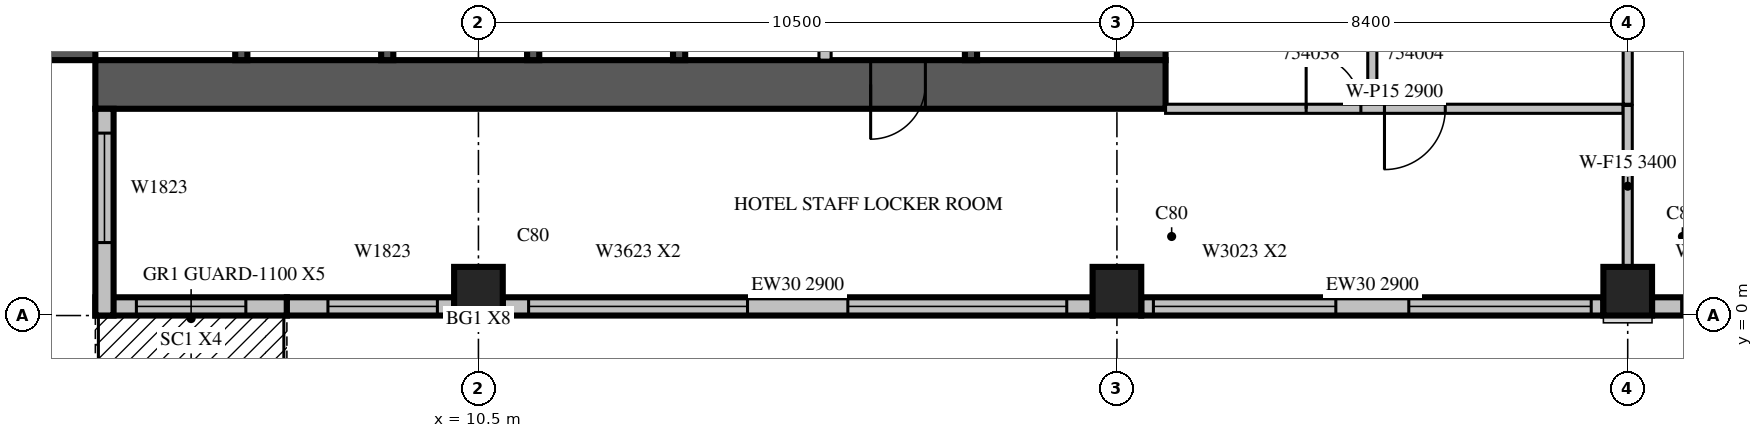
"""IFC4 building model, lengths in metres.
Left out: names, types, materials, properties, quantities, classifications, styles, units other than length and angle.
Written with IfcOpenShell. Run it as: python <this file> out.ifc"""

import sys

from ifc_helpers import new_model, si_unit, direction, frame, frame_2d, origin, origin_2d, place, context, subcontext, project, spatial, rectangle, extrude, source, transform, mapped, element, fill, save


model = new_model("IFC4")
c1 = context("Model", 3, precision=1e-05, world=origin(), true_north=direction((0.0, 1.0)))
c2 = subcontext(c1, "Body", "Model", "MODEL_VIEW")
j1 = project(units=[si_unit("LENGTHUNIT", "METRE"), si_unit("PLANEANGLEUNIT", "RADIAN")], contexts=[c1])
p1 = place(None, origin())
s1 = spatial("IfcSite", under=j1, at=p1, CompositionType="ELEMENT")
p2 = place(p1, origin())
s2 = spatial("IfcBuilding", under=s1, at=p2, CompositionType="ELEMENT")
p3 = place(p2, frame((0.0, 0.0, 238.6)))
s3 = spatial("IfcBuildingStorey", under=s2, at=p3, CompositionType="ELEMENT", Elevation=238.6)
m1 = source(origin(), c2, "Body", "SweptSolid", [
    extrude(rectangle(XDim=0.8, YDim=0.8, at=origin_2d()), origin(), (0.0, 0.0, 1.0), 3.8),
])
for number, where, z_axis, x_axis in (
    (1, (10.5, 0.4, 0.0), (0.0, 0.0, 1.0), (1.0, 0.0, 0.0)),
    (2, (21.0, 0.4, 0.0), (0.0, 0.0, 1.0), (1.0, 0.0, 0.0)),
    (3, (29.4, 0.4, 0.0), (0.0, 0.0, 1.0), (1.0, 0.0, 0.0)),
):
    element("IfcColumn", number, at=place(p3, frame(where, z_axis=z_axis, x_axis=x_axis)), inside=s3, PredefinedType="COLUMN", context=c2, shape_type="MappedRepresentation", body=[
        mapped(m1, transform((0.0, 0.0, 0.0), scale=1.0)),
    ])
m2 = source(origin(), c2, "Body", "SweptSolid", [
    extrude(rectangle(XDim=17.6, YDim=0.8, at=frame_2d((8.8, 0.0))), origin(), (0.0, 0.0, 1.0), 3.8),
])
p4 = place(p3, frame((3.8, 4.2, 0.0), z_axis=(0.0, 0.0, 1.0), x_axis=(0.0, 1.0, 0.0)))
e4 = element("IfcWall", 4, at=p4, inside=s3, PredefinedType="SHEAR", context=c2, shape_type="MappedRepresentation", body=[
    mapped(m2, transform((0.0, 0.0, 0.0), scale=1.0)),
])
m3 = source(origin(), c2, "Body", "SweptSolid", [
    extrude(rectangle(XDim=2.2, YDim=2.1, at=frame_2d((1.1, 1.05))), frame((0.0, 0.41, 0.0), z_axis=(0.0, -1.0, 0.0), x_axis=(1.0, 0.0, 0.0)), (0.0, 0.0, 1.0), 0.82),
])
p5 = place(p4, frame((4.2, 0.0, 0.0)))
e5 = element("IfcOpeningElement", 5, at=p5, cuts=e4, PredefinedType="OPENING", context=c2, shape_type="MappedRepresentation", body=[
    mapped(m3, transform((0.0, 0.0, 0.0), scale=1.0)),
])
m4 = source(origin(), c2, "Body", "SweptSolid", [
    extrude(rectangle(XDim=0.9, YDim=2.1, at=frame_2d((0.45, 1.05))), frame((0.0, 0.41, 0.0), z_axis=(0.0, -1.0, 0.0), x_axis=(1.0, 0.0, 0.0)), (0.0, 0.0, 1.0), 0.82),
])
p6 = place(p4, frame((10.95, 0.0, 0.0)))
e6 = element("IfcOpeningElement", 6, at=p6, cuts=e4, PredefinedType="OPENING", context=c2, shape_type="MappedRepresentation", body=[
    mapped(m4, transform((0.0, 0.0, 0.0), scale=1.0)),
])
m5 = source(origin(), c2, "Body", "SweptSolid", [
    extrude(rectangle(XDim=16.8, YDim=0.8, at=frame_2d((8.4, 0.0))), origin(), (0.0, 0.0, 1.0), 3.8),
])
p7 = place(p3, frame((21.4, 4.2, 0.0), z_axis=(0.0, 0.0, 1.0), x_axis=(0.0, 1.0, 0.0)))
e7 = element("IfcWall", 7, at=p7, inside=s3, PredefinedType="SHEAR", context=c2, shape_type="MappedRepresentation", body=[
    mapped(m5, transform((0.0, 0.0, 0.0), scale=1.0)),
])
p8 = place(p7, frame((4.2, 0.0, 0.0)))
e8 = element("IfcOpeningElement", 8, at=p8, cuts=e7, PredefinedType="OPENING", context=c2, shape_type="MappedRepresentation", body=[
    mapped(m3, transform((0.0, 0.0, 0.0), scale=1.0)),
])
m6 = source(origin(), c2, "Body", "SweptSolid", [
    extrude(rectangle(XDim=1.2, YDim=2.1, at=frame_2d((0.6, 1.05))), frame((0.0, 0.41, 0.0), z_axis=(0.0, -1.0, 0.0), x_axis=(1.0, 0.0, 0.0)), (0.0, 0.0, 1.0), 0.82),
])
p9 = place(p7, frame((14.7, 0.0, 0.0)))
e9 = element("IfcOpeningElement", 9, at=p9, cuts=e7, PredefinedType="OPENING", context=c2, shape_type="MappedRepresentation", body=[
    mapped(m6, transform((0.0, 0.0, 0.0), scale=1.0)),
])
p10 = place(p3, frame((4.2, 3.8, 0.0), z_axis=(0.0, 0.0, 1.0), x_axis=(1.0, 0.0, 0.0)))
e10 = element("IfcWall", 10, at=p10, inside=s3, PredefinedType="SHEAR", context=c2, shape_type="MappedRepresentation", body=[
    mapped(m2, transform((0.0, 0.0, 0.0), scale=1.0)),
])
p11 = place(p10, frame((12.75, 0.0, 0.0)))
e11 = element("IfcOpeningElement", 11, at=p11, cuts=e10, PredefinedType="OPENING", context=c2, shape_type="MappedRepresentation", body=[
    mapped(m4, transform((0.0, 0.0, 0.0), scale=1.0)),
])
m7 = source(origin(), c2, "Body", "SweptSolid", [
    extrude(rectangle(XDim=3.15, YDim=0.3, at=frame_2d((1.575, 0.0))), origin(), (0.0, 0.0, 1.0), 3.4),
])
p12 = place(p3, frame((4.2, 0.15, 0.0), z_axis=(0.0, 0.0, 1.0), x_axis=(1.0, 0.0, 0.0)))
e12 = element("IfcWall", 12, at=p12, inside=s3, PredefinedType="STANDARD", context=c2, shape_type="MappedRepresentation", body=[
    mapped(m7, transform((0.0, 0.0, 0.0), scale=1.0)),
])
m8 = source(origin(), c2, "Body", "SweptSolid", [
    extrude(rectangle(XDim=1.8, YDim=2.4, at=frame_2d((0.9, 1.2))), frame((0.0, 0.16, 0.0), z_axis=(0.0, -1.0, 0.0), x_axis=(1.0, 0.0, 0.0)), (0.0, 0.0, 1.0), 0.32),
])
p13 = place(p12, frame((0.675, 0.0, 0.0)))
e13 = element("IfcOpeningElement", 13, at=p13, cuts=e12, PredefinedType="OPENING", context=c2, shape_type="MappedRepresentation", body=[
    mapped(m8, transform((0.0, 0.0, 0.0), scale=1.0)),
])
m9 = source(origin(), c2, "Body", "SweptSolid", [
    extrude(rectangle(XDim=2.75, YDim=0.3, at=frame_2d((1.375, 0.0))), origin(), (0.0, 0.0, 1.0), 3.4),
])
p14 = place(p3, frame((7.35, 0.15, 0.0), z_axis=(0.0, 0.0, 1.0), x_axis=(1.0, 0.0, 0.0)))
e14 = element("IfcWall", 14, at=p14, inside=s3, PredefinedType="STANDARD", context=c2, shape_type="MappedRepresentation", body=[
    mapped(m9, transform((0.0, 0.0, 0.0), scale=1.0)),
])
m10 = source(origin(), c2, "Body", "SweptSolid", [
    extrude(rectangle(XDim=1.8, YDim=2.3, at=frame_2d((0.9, 1.15))), frame((0.0, 0.16, 0.0), z_axis=(0.0, -1.0, 0.0), x_axis=(1.0, 0.0, 0.0)), (0.0, 0.0, 1.0), 0.32),
])
p15 = place(p14, frame((0.675, 0.0, 0.6)))
e15 = element("IfcOpeningElement", 15, at=p15, cuts=e14, PredefinedType="OPENING", context=c2, shape_type="MappedRepresentation", body=[
    mapped(m10, transform((0.0, 0.0, 0.0), scale=1.0)),
])
m11 = source(origin(), c2, "Body", "SweptSolid", [
    extrude(rectangle(XDim=9.7, YDim=0.3, at=frame_2d((4.85, 0.0))), origin(), (0.0, 0.0, 1.0), 2.9),
])
p16 = place(p3, frame((10.9, 0.15, 0.0), z_axis=(0.0, 0.0, 1.0), x_axis=(1.0, 0.0, 0.0)))
e16 = element("IfcWall", 16, at=p16, inside=s3, PredefinedType="STANDARD", context=c2, shape_type="MappedRepresentation", body=[
    mapped(m11, transform((0.0, 0.0, 0.0), scale=1.0)),
])
m12 = source(origin(), c2, "Body", "SweptSolid", [
    extrude(rectangle(XDim=3.6, YDim=2.3, at=frame_2d((1.8, 1.15))), frame((0.0, 0.16, 0.0), z_axis=(0.0, -1.0, 0.0), x_axis=(1.0, 0.0, 0.0)), (0.0, 0.0, 1.0), 0.32),
])
p17 = place(p16, frame((0.425, 0.0, 0.6)))
e17 = element("IfcOpeningElement", 17, at=p17, cuts=e16, PredefinedType="OPENING", context=c2, shape_type="MappedRepresentation", body=[
    mapped(m12, transform((0.0, 0.0, 0.0), scale=1.0)),
])
p18 = place(p16, frame((5.675, 0.0, 0.6)))
e18 = element("IfcOpeningElement", 18, at=p18, cuts=e16, PredefinedType="OPENING", context=c2, shape_type="MappedRepresentation", body=[
    mapped(m12, transform((0.0, 0.0, 0.0), scale=1.0)),
])
m13 = source(origin(), c2, "Body", "SweptSolid", [
    extrude(rectangle(XDim=7.6, YDim=0.3, at=frame_2d((3.8, 0.0))), origin(), (0.0, 0.0, 1.0), 2.9),
])
p19 = place(p3, frame((21.4, 0.15, 0.0), z_axis=(0.0, 0.0, 1.0), x_axis=(1.0, 0.0, 0.0)))
e19 = element("IfcWall", 19, at=p19, inside=s3, PredefinedType="STANDARD", context=c2, shape_type="MappedRepresentation", body=[
    mapped(m13, transform((0.0, 0.0, 0.0), scale=1.0)),
])
m14 = source(origin(), c2, "Body", "SweptSolid", [
    extrude(rectangle(XDim=3.0, YDim=2.3, at=frame_2d((1.5, 1.15))), frame((0.0, 0.16, 0.0), z_axis=(0.0, -1.0, 0.0), x_axis=(1.0, 0.0, 0.0)), (0.0, 0.0, 1.0), 0.32),
])
p20 = place(p19, frame((0.2, 0.0, 0.6)))
e20 = element("IfcOpeningElement", 20, at=p20, cuts=e19, PredefinedType="OPENING", context=c2, shape_type="MappedRepresentation", body=[
    mapped(m14, transform((0.0, 0.0, 0.0), scale=1.0)),
])
p21 = place(p19, frame((4.4, 0.0, 0.6)))
e21 = element("IfcOpeningElement", 21, at=p21, cuts=e19, PredefinedType="OPENING", context=c2, shape_type="MappedRepresentation", body=[
    mapped(m14, transform((0.0, 0.0, 0.0), scale=1.0)),
])
m15 = source(origin(), c2, "Body", "SweptSolid", [
    extrude(rectangle(XDim=7.6, YDim=0.3, at=frame_2d((3.8, 0.0))), origin(), (0.0, 0.0, 1.0), 3.4),
])
p22 = place(p3, frame((29.8, 0.15, 0.0), z_axis=(0.0, 0.0, 1.0), x_axis=(1.0, 0.0, 0.0)))
e22 = element("IfcWall", 22, at=p22, inside=s3, PredefinedType="STANDARD", context=c2, shape_type="MappedRepresentation", body=[
    mapped(m15, transform((0.0, 0.0, 0.0), scale=1.0)),
])
m16 = source(origin(), c2, "Body", "SweptSolid", [
    extrude(rectangle(XDim=1.2, YDim=2.3, at=frame_2d((0.6, 1.15))), frame((0.0, 0.16, 0.0), z_axis=(0.0, -1.0, 0.0), x_axis=(1.0, 0.0, 0.0)), (0.0, 0.0, 1.0), 0.32),
])
p23 = place(p22, frame((0.487, 0.0, 0.6)))
e23 = element("IfcOpeningElement", 23, at=p23, cuts=e22, PredefinedType="OPENING", context=c2, shape_type="MappedRepresentation", body=[
    mapped(m16, transform((0.0, 0.0, 0.0), scale=1.0)),
])
p24 = place(p22, frame((6.013, 0.0, 0.6)))
e24 = element("IfcOpeningElement", 24, at=p24, cuts=e22, PredefinedType="OPENING", context=c2, shape_type="MappedRepresentation", body=[
    mapped(m16, transform((0.0, 0.0, 0.0), scale=1.0)),
])
m17 = source(origin(), c2, "Body", "SweptSolid", [
    extrude(rectangle(XDim=3.4, YDim=0.3, at=frame_2d((1.7, 0.0))), origin(), (0.0, 0.0, 1.0), 3.4),
])
p25 = place(p3, frame((4.35, 3.4, 0.0), z_axis=(0.0, 0.0, 1.0), x_axis=(0.0, -1.0, 0.0)))
e25 = element("IfcWall", 25, at=p25, inside=s3, PredefinedType="STANDARD", context=c2, shape_type="MappedRepresentation", body=[
    mapped(m17, transform((0.0, 0.0, 0.0), scale=1.0)),
])
p26 = place(p25, frame((0.4, 0.0, 0.6)))
e26 = element("IfcOpeningElement", 26, at=p26, cuts=e25, PredefinedType="OPENING", context=c2, shape_type="MappedRepresentation", body=[
    mapped(m10, transform((0.0, 0.0, 0.0), scale=1.0)),
])
m18 = source(origin(), c2, "Body", "SweptSolid", [
    extrude(rectangle(XDim=3.1, YDim=0.2, at=frame_2d((1.55, 0.0))), origin(), (0.0, 0.0, 1.0), 3.8),
])
for number, where, z_axis, x_axis in (
    (27, (6.6, 4.2, 0.0), (0.0, 0.0, 1.0), (0.0, 1.0, 0.0)),
    (28, (9.0, 4.2, 0.0), (0.0, 0.0, 1.0), (0.0, 1.0, 0.0)),
    (29, (11.4, 4.2, 0.0), (0.0, 0.0, 1.0), (0.0, 1.0, 0.0)),
):
    element("IfcWall", number, at=place(p3, frame(where, z_axis=z_axis, x_axis=x_axis)), inside=s3, PredefinedType="SOLIDWALL", context=c2, shape_type="MappedRepresentation", body=[
        mapped(m18, transform((0.0, 0.0, 0.0), scale=1.0)),
    ])
m19 = source(origin(), c2, "Body", "SweptSolid", [
    extrude(rectangle(XDim=3.1, YDim=0.2, at=frame_2d((1.55, 0.0))), origin(), (0.0, 0.0, 1.0), 3.4),
])
for number, where, z_axis, x_axis in (
    (30, (13.8, 4.2, 0.0), (0.0, 0.0, 1.0), (0.0, 1.0, 0.0)),
    (31, (18.6, 4.2, 0.0), (0.0, 0.0, 1.0), (0.0, 1.0, 0.0)),
):
    element("IfcWall", number, at=place(p3, frame(where, z_axis=z_axis, x_axis=x_axis)), inside=s3, PredefinedType="SOLIDWALL", context=c2, shape_type="MappedRepresentation", body=[
        mapped(m19, transform((0.0, 0.0, 0.0), scale=1.0)),
    ])
m20 = source(origin(), c2, "Body", "SweptSolid", [
    extrude(rectangle(XDim=3.1, YDim=0.2, at=frame_2d((1.55, 0.0))), origin(), (0.0, 0.0, 1.0), 3.4),
])
p27 = place(p3, frame((16.2, 4.2, 0.0), z_axis=(0.0, 0.0, 1.0), x_axis=(0.0, 1.0, 0.0)))
e32 = element("IfcWall", 32, at=p27, inside=s3, PredefinedType="PARTITIONING", context=c2, shape_type="MappedRepresentation", body=[
    mapped(m20, transform((0.0, 0.0, 0.0), scale=1.0)),
])
m21 = source(origin(), c2, "Body", "SweptSolid", [
    extrude(rectangle(XDim=11.225, YDim=0.15, at=frame_2d((5.612, 0.0))), origin(), (0.0, 0.0, 1.0), 2.4),
])
p28 = place(p3, frame((25.2, 14.7, 0.0), z_axis=(0.0, 0.0, 1.0), x_axis=(0.0, -1.0, 0.0)))
e33 = element("IfcWall", 33, at=p28, inside=s3, PredefinedType="PARTITIONING", context=c2, shape_type="MappedRepresentation", body=[
    mapped(m21, transform((0.0, 0.0, 0.0), scale=1.0)),
])
m22 = source(origin(), c2, "Body", "SweptSolid", [
    extrude(rectangle(XDim=0.9, YDim=2.1, at=frame_2d((0.45, 1.05))), frame((0.0, 0.085, 0.0), z_axis=(0.0, -1.0, 0.0), x_axis=(1.0, 0.0, 0.0)), (0.0, 0.0, 1.0), 0.17),
])
p29 = place(p28, frame((6.662, 0.0, 0.0)))
e34 = element("IfcOpeningElement", 34, at=p29, cuts=e33, PredefinedType="OPENING", context=c2, shape_type="MappedRepresentation", body=[
    mapped(m22, transform((0.0, 0.0, 0.0), scale=1.0)),
])
p30 = place(p28, frame((0.175, 0.0, 0.0)))
e35 = element("IfcOpeningElement", 35, at=p30, cuts=e33, PredefinedType="OPENING", context=c2, shape_type="MappedRepresentation", body=[
    mapped(m22, transform((0.0, 0.0, 0.0), scale=1.0)),
])
m23 = source(origin(), c2, "Body", "SweptSolid", [
    extrude(rectangle(XDim=6.626, YDim=0.15, at=frame_2d((3.313, 0.0))), origin(), (0.0, 0.0, 1.0), 3.4),
])
p31 = place(p3, frame((29.4, 3.475, 0.0), z_axis=(0.0, 0.0, 1.0), x_axis=(0.0, 1.0, 0.0)))
e36 = element("IfcWall", 36, at=p31, inside=s3, PredefinedType="PARTITIONING", context=c2, shape_type="MappedRepresentation", body=[
    mapped(m23, transform((0.0, 0.0, 0.0), scale=1.0)),
])
m24 = source(origin(), c2, "Body", "SweptSolid", [
    extrude(rectangle(XDim=7.525, YDim=0.15, at=frame_2d((3.763, 0.0))), origin(), (0.0, 0.0, 1.0), 2.9),
])
p32 = place(p3, frame((21.8, 3.4, 0.0), z_axis=(0.0, 0.0, 1.0), x_axis=(1.0, 0.0, 0.0)))
e37 = element("IfcWall", 37, at=p32, inside=s3, PredefinedType="PARTITIONING", context=c2, shape_type="MappedRepresentation", body=[
    mapped(m24, transform((0.0, 0.0, 0.0), scale=1.0)),
])
m25 = source(origin(), c2, "Body", "SweptSolid", [
    extrude(rectangle(XDim=1.0, YDim=2.1, at=frame_2d((0.5, 1.05))), frame((0.0, 0.085, 0.0), z_axis=(0.0, -1.0, 0.0), x_axis=(1.0, 0.0, 0.0)), (0.0, 0.0, 1.0), 0.17),
])
p33 = place(p32, frame((3.6, 0.0, 0.0)))
e38 = element("IfcOpeningElement", 38, at=p33, cuts=e37, PredefinedType="OPENING", context=c2, shape_type="MappedRepresentation", body=[
    mapped(m25, transform((0.0, 0.0, 0.0), scale=1.0)),
])
p34 = place(p32, frame((2.312, 0.0, 0.0)))
e39 = element("IfcOpeningElement", 39, at=p34, cuts=e37, PredefinedType="OPENING", context=c2, shape_type="MappedRepresentation", body=[
    mapped(m22, transform((0.0, 0.0, 0.0), scale=1.0)),
])
m26 = source(origin(), c2, "Body", "SweptSolid", [
    extrude(rectangle(XDim=2.656, YDim=0.15, at=frame_2d((1.328, 0.0))), origin(), (0.0, 0.0, 1.0), 3.4),
])
p35 = place(p3, frame((29.4, 0.799, 0.0), z_axis=(0.0, 0.0, 1.0), x_axis=(0.0, 1.0, 0.0)))
e40 = element("IfcWall", 40, at=p35, inside=s3, PredefinedType="PARTITIONING", context=c2, shape_type="MappedRepresentation", body=[
    mapped(m26, transform((0.0, 0.0, 0.0), scale=1.0)),
])
m27 = source(origin(), c2, "Body", "SweptSolid", [
    extrude(rectangle(XDim=1.8, YDim=2.4, at=frame_2d((0.9, 1.2))), frame((0.0, 0.025, 0.0), z_axis=(0.0, -1.0, 0.0), x_axis=(1.0, 0.0, 0.0)), (0.0, 0.0, 1.0), 0.05),
])
p36 = place(p13, origin())
e41 = element("IfcDoor", 41, at=p36, inside=s3, OperationType="SLIDING_TO_LEFT", PredefinedType="DOOR", context=c2, shape_type="MappedRepresentation", body=[
    mapped(m27, transform((0.0, 0.0, 0.0), scale=1.0)),
])
fill(e13, e41)
m28 = source(origin(), c2, "Body", "SweptSolid", [
    extrude(rectangle(XDim=1.8, YDim=2.3, at=frame_2d((0.9, 1.15))), frame((0.0, 0.03, 0.0), z_axis=(0.0, -1.0, 0.0), x_axis=(1.0, 0.0, 0.0)), (0.0, 0.0, 1.0), 0.06),
])
p37 = place(p15, origin())
e42 = element("IfcWindow", 42, at=p37, inside=s3, PartitioningType="SINGLE_PANEL", PredefinedType="WINDOW", context=c2, shape_type="MappedRepresentation", body=[
    mapped(m28, transform((0.0, 0.0, 0.0), scale=1.0)),
])
fill(e15, e42)
m29 = source(origin(), c2, "Body", "SweptSolid", [
    extrude(rectangle(XDim=3.6, YDim=2.3, at=frame_2d((1.8, 1.15))), frame((0.0, 0.03, 0.0), z_axis=(0.0, -1.0, 0.0), x_axis=(1.0, 0.0, 0.0)), (0.0, 0.0, 1.0), 0.06),
])
p38 = place(p17, origin())
e43 = element("IfcWindow", 43, at=p38, inside=s3, PartitioningType="SINGLE_PANEL", PredefinedType="WINDOW", context=c2, shape_type="MappedRepresentation", body=[
    mapped(m29, transform((0.0, 0.0, 0.0), scale=1.0)),
])
fill(e17, e43)
p39 = place(p18, origin())
e44 = element("IfcWindow", 44, at=p39, inside=s3, PartitioningType="SINGLE_PANEL", PredefinedType="WINDOW", context=c2, shape_type="MappedRepresentation", body=[
    mapped(m29, transform((0.0, 0.0, 0.0), scale=1.0)),
])
fill(e18, e44)
m30 = source(origin(), c2, "Body", "SweptSolid", [
    extrude(rectangle(XDim=3.0, YDim=2.3, at=frame_2d((1.5, 1.15))), frame((0.0, 0.03, 0.0), z_axis=(0.0, -1.0, 0.0), x_axis=(1.0, 0.0, 0.0)), (0.0, 0.0, 1.0), 0.06),
])
p40 = place(p20, origin())
e45 = element("IfcWindow", 45, at=p40, inside=s3, PartitioningType="SINGLE_PANEL", PredefinedType="WINDOW", context=c2, shape_type="MappedRepresentation", body=[
    mapped(m30, transform((0.0, 0.0, 0.0), scale=1.0)),
])
fill(e20, e45)
p41 = place(p21, origin())
e46 = element("IfcWindow", 46, at=p41, inside=s3, PartitioningType="SINGLE_PANEL", PredefinedType="WINDOW", context=c2, shape_type="MappedRepresentation", body=[
    mapped(m30, transform((0.0, 0.0, 0.0), scale=1.0)),
])
fill(e21, e46)
m31 = source(origin(), c2, "Body", "SweptSolid", [
    extrude(rectangle(XDim=1.2, YDim=2.3, at=frame_2d((0.6, 1.15))), frame((0.0, 0.03, 0.0), z_axis=(0.0, -1.0, 0.0), x_axis=(1.0, 0.0, 0.0)), (0.0, 0.0, 1.0), 0.06),
])
p42 = place(p23, origin())
e47 = element("IfcWindow", 47, at=p42, inside=s3, PartitioningType="SINGLE_PANEL", PredefinedType="WINDOW", context=c2, shape_type="MappedRepresentation", body=[
    mapped(m31, transform((0.0, 0.0, 0.0), scale=1.0)),
])
fill(e23, e47)
p43 = place(p26, origin())
e48 = element("IfcWindow", 48, at=p43, inside=s3, PartitioningType="SINGLE_PANEL", PredefinedType="WINDOW", context=c2, shape_type="MappedRepresentation", body=[
    mapped(m28, transform((0.0, 0.0, 0.0), scale=1.0)),
])
fill(e26, e48)
m32 = source(origin(), c2, "Body", "SweptSolid", [
    extrude(rectangle(XDim=0.9, YDim=2.1, at=frame_2d((0.45, 1.05))), frame((0.0, 0.025, 0.0), z_axis=(0.0, -1.0, 0.0), x_axis=(1.0, 0.0, 0.0)), (0.0, 0.0, 1.0), 0.05),
])
p44 = place(p11, origin())
e49 = element("IfcDoor", 49, at=p44, inside=s3, OperationType="SINGLE_SWING_RIGHT", PredefinedType="DOOR", context=c2, shape_type="MappedRepresentation", body=[
    mapped(m32, transform((0.0, 0.0, 0.0), scale=1.0)),
])
fill(e11, e49)
m33 = source(origin(), c2, "Body", "SweptSolid", [
    extrude(rectangle(XDim=1.0, YDim=2.1, at=frame_2d((0.5, 1.05))), frame((0.0, 0.025, 0.0), z_axis=(0.0, -1.0, 0.0), x_axis=(1.0, 0.0, 0.0)), (0.0, 0.0, 1.0), 0.05),
])
p45 = place(p33, origin())
e50 = element("IfcDoor", 50, at=p45, inside=s3, OperationType="SINGLE_SWING_RIGHT", PredefinedType="DOOR", context=c2, shape_type="MappedRepresentation", body=[
    mapped(m33, transform((0.0, 0.0, 0.0), scale=1.0)),
])
fill(e38, e50)
p46 = place(p34, origin())
e51 = element("IfcDoor", 51, at=p46, inside=s3, OperationType="SINGLE_SWING_LEFT", PredefinedType="DOOR", context=c2, shape_type="MappedRepresentation", body=[
    mapped(m32, transform((0.0, 0.0, 0.0), scale=1.0)),
])
fill(e39, e51)
save(model, sys.argv[1])
